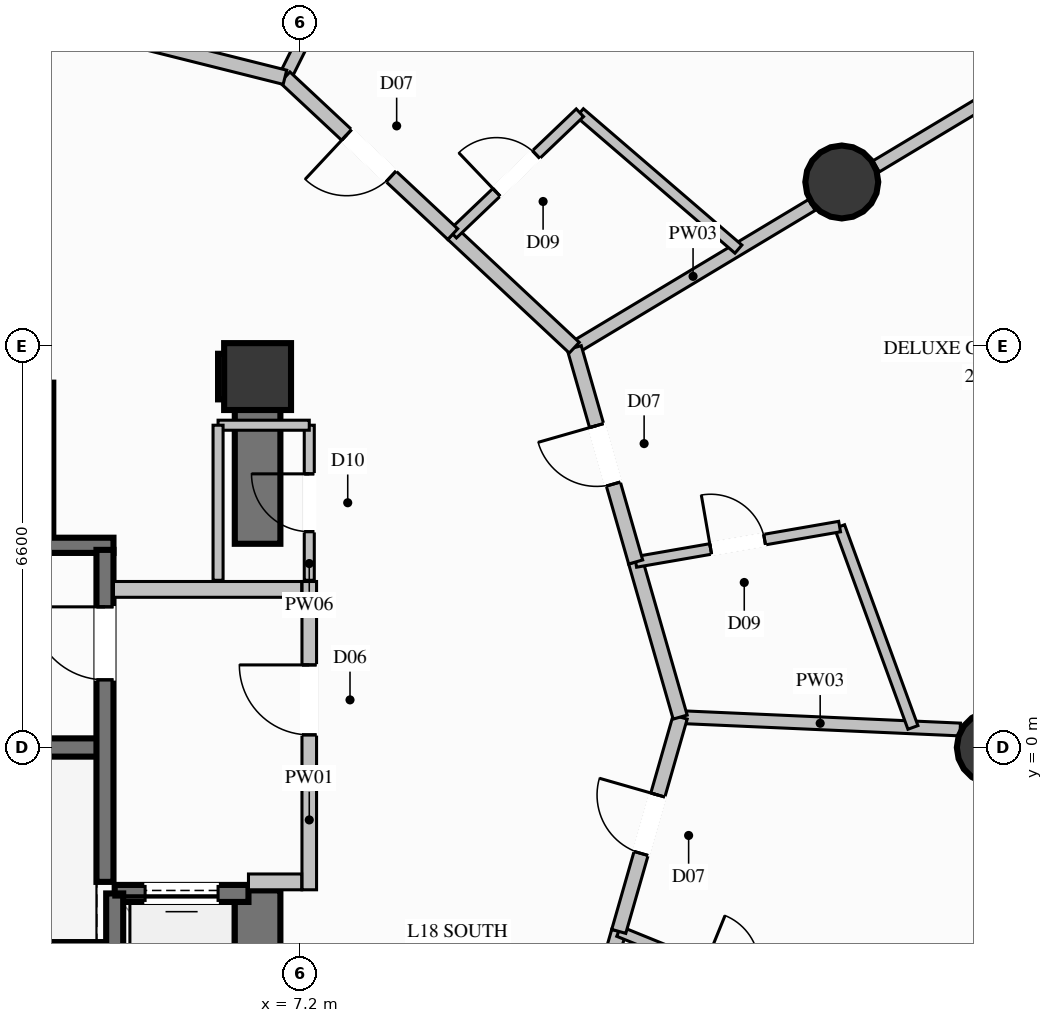
"""IFC4 building model, lengths in metres.
Left out: names, types, materials, properties, quantities, classifications, styles, units other than length and angle.
Written with IfcOpenShell. Run it as: python <this file> out.ifc"""

import sys

from ifc_helpers import new_model, si_unit, direction, frame, frame_2d, origin, origin_2d, place, context, subcontext, project, spatial, rectangle, circle, extrude, element, fill, save


model = new_model("IFC4")
c1 = context("Model", 3, precision=1e-05, world=origin(), true_north=direction((0.0, 1.0)))
c2 = subcontext(c1, "Body", "Model", "MODEL_VIEW")
j1 = project(units=[si_unit("LENGTHUNIT", "METRE"), si_unit("PLANEANGLEUNIT", "RADIAN")], contexts=[c1])
p1 = place(None, origin())
s1 = spatial("IfcSite", under=j1, at=p1, CompositionType="ELEMENT")
p2 = place(p1, origin())
s2 = spatial("IfcBuilding", under=s1, at=p2, CompositionType="ELEMENT")
p3 = place(p2, frame((0.0, 0.0, 75.2)))
s3 = spatial("IfcBuildingStorey", under=s2, at=p3, CompositionType="ELEMENT", Elevation=75.2)
p4 = place(p3, frame((6.5, 6.1, 0.0), z_axis=(0.0, 0.0, 1.0), x_axis=(1.0, 0.0, 0.0)))
e1 = element("IfcColumn", 1, at=p4, inside=s3, PredefinedType="COLUMN", context=c2, shape_type="SweptSolid", body=[
    extrude(rectangle(XDim=1.1, YDim=1.1, at=origin_2d()), origin(), (0.0, 0.0, 1.0), 3.6),
])
p5 = place(p3, frame((-3.99, 0.0, 0.0), z_axis=(0.0, 0.0, 1.0), x_axis=(1.0, 0.0, 0.0)))
e2 = element("IfcWall", 2, at=p5, inside=s3, PredefinedType="SHEAR", context=c2, shape_type="SweptSolid", body=[
    extrude(rectangle(XDim=7.98, YDim=0.3, at=frame_2d((3.99, 0.0))), origin(), (0.0, 0.0, 1.0), 3.6),
])
for number, where, z_axis, x_axis in (
    (3, (-4.13, -3.325, 0.0), (0.0, 0.0, 1.0), (1.0, 0.0, 0.0)),
    (4, (-4.13, 3.325, 0.0), (0.0, 0.0, 1.0), (1.0, 0.0, 0.0)),
):
    element("IfcWall", number, at=place(p3, frame(where, z_axis=z_axis, x_axis=x_axis)), inside=s3, PredefinedType="SOLIDWALL", context=c2, shape_type="SweptSolid", body=[
        extrude(rectangle(XDim=8.26, YDim=0.25, at=frame_2d((4.13, 0.0))), origin(), (0.0, 0.0, 1.0), 3.6),
    ])
p6 = place(p3, frame((5.85, 6.1, 0.0), z_axis=(0.0, 0.0, 1.0), x_axis=(1.0, 0.0, 0.0)))
e5 = element("IfcWall", 5, at=p6, inside=s3, PredefinedType="SHEAR", context=c2, shape_type="SweptSolid", body=[
    extrude(rectangle(XDim=0.275, YDim=0.75, at=frame_2d((0.137, 0.0))), origin(), (0.0, 0.0, 1.0), 3.6),
])
p7 = place(p3, frame((6.5, -6.475, 0.0), z_axis=(0.0, 0.0, 1.0), x_axis=(0.0, 1.0, 0.0)))
e6 = element("IfcWall", 6, at=p7, inside=s3, PredefinedType="SHEAR", context=c2, shape_type="SweptSolid", body=[
    extrude(rectangle(XDim=4.125, YDim=0.75, at=frame_2d((2.062, 0.0))), origin(), (0.0, 0.0, 1.0), 3.6),
])
p8 = place(p3, frame((6.5, 3.35, 0.0), z_axis=(0.0, 0.0, 1.0), x_axis=(0.0, 1.0, 0.0)))
e7 = element("IfcWall", 7, at=p8, inside=s3, PredefinedType="SHEAR", context=c2, shape_type="SweptSolid", body=[
    extrude(rectangle(XDim=3.125, YDim=0.75, at=frame_2d((1.562, 0.0))), origin(), (0.0, 0.0, 1.0), 3.6),
])
for number, where, z_axis, x_axis in (
    (8, (18.6, 0.0, 0.0), (0.0, 0.0, 1.0), (1.0, 0.0, 0.0)),
    (9, (16.108, 9.3, 0.0), (0.0, 0.0, 1.0), (1.0, 0.0, 0.0)),
):
    element("IfcColumn", number, at=place(p3, frame(where, z_axis=z_axis, x_axis=x_axis)), inside=s3, PredefinedType="COLUMN", context=c2, shape_type="SweptSolid", body=[
        extrude(circle(Radius=0.6, at=origin_2d()), origin(), (0.0, 0.0, 1.0), 3.6),
    ])
p9 = place(p3, frame((13.987, 16.682, 0.0), z_axis=(0.0, 0.0, 1.0), x_axis=(0.73100047145, -0.682376956484, 0.0)))
e10 = element("IfcWall", 10, at=p9, inside=s3, PredefinedType="SOLIDWALL", context=c2, shape_type="SweptSolid", body=[
    extrude(rectangle(XDim=8.149, YDim=0.32, at=frame_2d((4.075, 0.0))), origin(), (0.0, 0.0, 1.0), 3.34),
])
p10 = place(p9, frame((2.941, 0.0, 0.35)))
e11 = element("IfcOpeningElement", 11, at=p10, cuts=e10, PredefinedType="OPENING", context=c2, shape_type="SweptSolid", body=[
    extrude(rectangle(XDim=1.8, YDim=2.6, at=frame_2d((0.9, 1.3))), frame((0.0, 0.17, 0.0), z_axis=(0.0, -1.0, 0.0), x_axis=(1.0, 0.0, 0.0)), (0.0, 0.0, 1.0), 0.34),
])
p11 = place(p3, frame((3.0, 3.5, 0.0), z_axis=(0.0, 0.0, 1.0), x_axis=(0.0, 1.0, 0.0)))
e12 = element("IfcWall", 12, at=p11, inside=s3, PredefinedType="SOLIDWALL", context=c2, shape_type="SweptSolid", body=[
    extrude(rectangle(XDim=2.5, YDim=0.28, at=frame_2d((1.25, 0.0))), origin(), (0.0, 0.0, 1.0), 3.34),
])
p12 = place(p3, frame((6.35, -2.4, 0.0), z_axis=(0.0, 0.0, 1.0), x_axis=(-1.0, 0.0, 0.0)))
e13 = element("IfcWall", 13, at=p12, inside=s3, PredefinedType="SOLIDWALL", context=c2, shape_type="SweptSolid", body=[
    extrude(rectangle(XDim=2.2, YDim=0.28, at=frame_2d((1.1, 0.0))), origin(), (0.0, 0.0, 1.0), 3.34),
])
p13 = place(p12, frame((0.5, 0.0, 0.0)))
e14 = element("IfcOpeningElement", 14, at=p13, cuts=e13, PredefinedType="OPENING", context=c2, shape_type="SweptSolid", body=[
    extrude(rectangle(XDim=1.2, YDim=2.2, at=frame_2d((0.6, 1.1))), frame((0.0, 0.15, 0.0), z_axis=(0.0, -1.0, 0.0), x_axis=(1.0, 0.0, 0.0)), (0.0, 0.0, 1.0), 0.3),
])
p14 = place(p3, frame((4.15, -2.4, 0.0), z_axis=(0.0, 0.0, 1.0), x_axis=(0.0, -1.0, 0.0)))
e15 = element("IfcWall", 15, at=p14, inside=s3, PredefinedType="SOLIDWALL", context=c2, shape_type="SweptSolid", body=[
    extrude(rectangle(XDim=2.7, YDim=0.28, at=frame_2d((1.35, 0.0))), origin(), (0.0, 0.0, 1.0), 3.34),
])
p15 = place(p3, frame((3.99, -2.21, 0.0), z_axis=(0.0, 0.0, 1.0), x_axis=(0.0, 1.0, 0.0)))
e16 = element("IfcWall", 16, at=p15, inside=s3, PredefinedType="SOLIDWALL", context=c2, shape_type="SweptSolid", body=[
    extrude(rectangle(XDim=5.46, YDim=0.28, at=frame_2d((2.73, 0.0))), origin(), (0.0, 0.0, 1.0), 3.34),
])
p16 = place(p15, frame((3.323, 0.0, 0.0)))
e17 = element("IfcOpeningElement", 17, at=p16, cuts=e16, PredefinedType="OPENING", context=c2, shape_type="SweptSolid", body=[
    extrude(rectangle(XDim=1.2, YDim=2.2, at=frame_2d((0.6, 1.1))), frame((0.0, 0.15, 0.0), z_axis=(0.0, -1.0, 0.0), x_axis=(1.0, 0.0, 0.0)), (0.0, 0.0, 1.0), 0.3),
])
p17 = place(p3, frame((7.35, -2.34, 0.0), z_axis=(0.0, 0.0, 1.0), x_axis=(0.0, 1.0, 0.0)))
e18 = element("IfcWall", 18, at=p17, inside=s3, PredefinedType="PARTITIONING", context=c2, shape_type="SweptSolid", body=[
    extrude(rectangle(XDim=5.07, YDim=0.24, at=frame_2d((2.535, 0.0))), origin(), (0.0, 0.0, 1.0), 2.425),
])
p18 = place(p17, frame((2.548, 0.0, 0.0)))
e19 = element("IfcOpeningElement", 19, at=p18, cuts=e18, PredefinedType="OPENING", context=c2, shape_type="SweptSolid", body=[
    extrude(rectangle(XDim=1.15, YDim=2.2, at=frame_2d((0.575, 1.1))), frame((0.0, 0.13, 0.0), z_axis=(0.0, -1.0, 0.0), x_axis=(1.0, 0.0, 0.0)), (0.0, 0.0, 1.0), 0.26),
])
p19 = place(p3, frame((6.35, -2.21, 0.0), z_axis=(0.0, 0.0, 1.0), x_axis=(1.0, 0.0, 0.0)))
e20 = element("IfcWall", 20, at=p19, inside=s3, PredefinedType="PARTITIONING", context=c2, shape_type="SweptSolid", body=[
    extrude(rectangle(XDim=0.875, YDim=0.26, at=frame_2d((0.438, 0.0))), origin(), (0.0, 0.0, 1.0), 3.34),
])
p20 = place(p3, frame((4.13, 2.6, 0.0), z_axis=(0.0, 0.0, 1.0), x_axis=(1.0, 0.0, 0.0)))
e21 = element("IfcWall", 21, at=p20, inside=s3, PredefinedType="PARTITIONING", context=c2, shape_type="SweptSolid", body=[
    extrude(rectangle(XDim=3.095, YDim=0.26, at=frame_2d((1.548, 0.0))), origin(), (0.0, 0.0, 1.0), 3.34),
])
p21 = place(p3, frame((7.35, 2.75, 0.0), z_axis=(0.0, 0.0, 1.0), x_axis=(0.0, 1.0, 0.0)))
e22 = element("IfcWall", 22, at=p21, inside=s3, PredefinedType="PARTITIONING", context=c2, shape_type="SweptSolid", body=[
    extrude(rectangle(XDim=2.55, YDim=0.165, at=frame_2d((1.275, 0.0))), origin(), (0.0, 0.0, 1.0), 3.34),
])
p22 = place(p21, frame((0.8, 0.0, 0.0)))
e23 = element("IfcOpeningElement", 23, at=p22, cuts=e22, PredefinedType="OPENING", context=c2, shape_type="SweptSolid", body=[
    extrude(rectangle(XDim=0.95, YDim=2.1, at=frame_2d((0.475, 1.05))), frame((0.0, 0.093, 0.0), z_axis=(0.0, -1.0, 0.0), x_axis=(1.0, 0.0, 0.0)), (0.0, 0.0, 1.0), 0.185),
])
p23 = place(p3, frame((7.35, 5.3, 0.0), z_axis=(0.0, 0.0, 1.0), x_axis=(-1.0, 0.0, 0.0)))
e24 = element("IfcWall", 24, at=p23, inside=s3, PredefinedType="PARTITIONING", context=c2, shape_type="SweptSolid", body=[
    extrude(rectangle(XDim=1.5, YDim=0.165, at=frame_2d((0.75, 0.0))), origin(), (0.0, 0.0, 1.0), 2.425),
])
p24 = place(p3, frame((5.85, 5.3, 0.0), z_axis=(0.0, 0.0, 1.0), x_axis=(0.0, -1.0, 0.0)))
e25 = element("IfcWall", 25, at=p24, inside=s3, PredefinedType="PARTITIONING", context=c2, shape_type="SweptSolid", body=[
    extrude(rectangle(XDim=2.55, YDim=0.165, at=frame_2d((1.275, 0.0))), origin(), (0.0, 0.0, 1.0), 2.425),
])
p25 = place(p3, frame((13.45, 0.5, 0.0), z_axis=(0.0, 0.0, 1.0), x_axis=(0.999019228591, -0.044278447413, 0.0)))
e26 = element("IfcWall", 26, at=p25, inside=s3, PredefinedType="PARTITIONING", context=c2, shape_type="SweptSolid", body=[
    extrude(rectangle(XDim=4.61, YDim=0.21, at=frame_2d((2.305, 0.0))), origin(), (0.0, 0.0, 1.0), 3.34),
])
p26 = place(p3, frame((11.708, 6.575, 0.0), z_axis=(0.0, 0.0, 1.0), x_axis=(0.857261290525, 0.514881617236, 0.0)))
e27 = element("IfcWall", 27, at=p26, inside=s3, PredefinedType="PARTITIONING", context=c2, shape_type="SweptSolid", body=[
    extrude(rectangle(XDim=4.559, YDim=0.21, at=frame_2d((2.279, 0.0))), origin(), (0.0, 0.0, 1.0), 2.709),
])
p27 = place(p3, frame((16.672, 9.556, 0.0), z_axis=(0.0, 0.0, 1.0), x_axis=(0.857238479405, 0.514919595109, 0.0)))
e28 = element("IfcWall", 28, at=p27, inside=s3, PredefinedType="PARTITIONING", context=c2, shape_type="SweptSolid", body=[
    extrude(rectangle(XDim=3.473, YDim=0.21, at=frame_2d((1.736, 0.0))), origin(), (0.0, 0.0, 1.0), 3.34),
])
p28 = place(p3, frame((6.95, 11.022, 0.0), z_axis=(0.0, 0.0, 1.0), x_axis=(0.445768437474, 0.895148311819, 0.0)))
e29 = element("IfcWall", 29, at=p28, inside=s3, PredefinedType="PARTITIONING", context=c2, shape_type="SweptSolid", body=[
    extrude(rectangle(XDim=5.002, YDim=0.21, at=frame_2d((2.501, 0.0))), origin(), (0.0, 0.0, 1.0), 2.709),
])
p29 = place(p3, frame((11.708, -5.575, 0.0), z_axis=(0.0, 0.0, 1.0), x_axis=(0.275790140823, 0.961217872402, 0.0)))
e30 = element("IfcWall", 30, at=p29, inside=s3, PredefinedType="PARTITIONING", context=c2, shape_type="SweptSolid", body=[
    extrude(rectangle(XDim=2.654, YDim=0.24, at=frame_2d((1.327, 0.0))), origin(), (0.0, 0.0, 1.0), 3.34),
])
p30 = place(p3, frame((12.44, -3.024, 0.0), z_axis=(0.0, 0.0, 1.0), x_axis=(0.926338988139, -0.376690959613, 0.0)))
e31 = element("IfcWall", 31, at=p30, inside=s3, PredefinedType="PLUMBINGWALL", context=c2, shape_type="SweptSolid", body=[
    extrude(rectangle(XDim=3.943, YDim=0.175, at=frame_2d((1.971, 0.0))), origin(), (0.0, 0.0, 1.0), 3.34),
])
p31 = place(p30, frame((1.521, 0.0, 0.0)))
e32 = element("IfcOpeningElement", 32, at=p31, cuts=e31, PredefinedType="OPENING", context=c2, shape_type="SweptSolid", body=[
    extrude(rectangle(XDim=0.9, YDim=2.1, at=frame_2d((0.45, 1.05))), frame((0.0, 0.098, 0.0), z_axis=(0.0, -1.0, 0.0), x_axis=(1.0, 0.0, 0.0)), (0.0, 0.0, 1.0), 0.195),
])
p32 = place(p3, frame((12.44, -3.024, 0.0), z_axis=(0.0, 0.0, 1.0), x_axis=(0.275521481409, 0.961294914832, 0.0)))
e33 = element("IfcWall", 33, at=p32, inside=s3, PredefinedType="PARTITIONING", context=c2, shape_type="SweptSolid", body=[
    extrude(rectangle(XDim=3.666, YDim=0.24, at=frame_2d((1.833, 0.0))), origin(), (0.0, 0.0, 1.0), 3.34),
])
p33 = place(p32, frame((1.333, 0.0, 0.0)))
e34 = element("IfcOpeningElement", 34, at=p33, cuts=e33, PredefinedType="OPENING", context=c2, shape_type="SweptSolid", body=[
    extrude(rectangle(XDim=1.0, YDim=2.2, at=frame_2d((0.5, 1.1))), frame((0.0, 0.13, 0.0), z_axis=(0.0, -1.0, 0.0), x_axis=(1.0, 0.0, 0.0)), (0.0, 0.0, 1.0), 0.26),
])
p34 = place(p3, frame((13.45, 0.5, 0.0), z_axis=(0.0, 0.0, 1.0), x_axis=(-0.275790140823, 0.961217872402, 0.0)))
e35 = element("IfcWall", 35, at=p34, inside=s3, PredefinedType="PARTITIONING", context=c2, shape_type="SweptSolid", body=[
    extrude(rectangle(XDim=2.654, YDim=0.24, at=frame_2d((1.327, 0.0))), origin(), (0.0, 0.0, 1.0), 3.34),
])
p35 = place(p3, frame((17.278, 0.33, 0.0), z_axis=(0.0, 0.0, 1.0), x_axis=(-0.342991514452, 0.939338501827, 0.0)))
e36 = element("IfcWall", 36, at=p35, inside=s3, PredefinedType="PLUMBINGWALL", context=c2, shape_type="SweptSolid", body=[
    extrude(rectangle(XDim=3.516, YDim=0.175, at=frame_2d((1.758, 0.0))), origin(), (0.0, 0.0, 1.0), 3.34),
])
p36 = place(p3, frame((12.718, 3.051, 0.0), z_axis=(0.0, 0.0, 1.0), x_axis=(0.985274853181, 0.170977962584, 0.0)))
e37 = element("IfcWall", 37, at=p36, inside=s3, PredefinedType="PLUMBINGWALL", context=c2, shape_type="SweptSolid", body=[
    extrude(rectangle(XDim=3.404, YDim=0.175, at=frame_2d((1.702, 0.0))), origin(), (0.0, 0.0, 1.0), 3.34),
])
p37 = place(p36, frame((1.252, 0.0, 0.0)))
e38 = element("IfcOpeningElement", 38, at=p37, cuts=e37, PredefinedType="OPENING", context=c2, shape_type="SweptSolid", body=[
    extrude(rectangle(XDim=0.9, YDim=2.1, at=frame_2d((0.45, 1.05))), frame((0.0, 0.098, 0.0), z_axis=(0.0, -1.0, 0.0), x_axis=(1.0, 0.0, 0.0)), (0.0, 0.0, 1.0), 0.195),
])
p38 = place(p3, frame((12.718, 3.051, 0.0), z_axis=(0.0, 0.0, 1.0), x_axis=(-0.275521481409, 0.961294914832, 0.0)))
e39 = element("IfcWall", 39, at=p38, inside=s3, PredefinedType="PARTITIONING", context=c2, shape_type="SweptSolid", body=[
    extrude(rectangle(XDim=3.666, YDim=0.24, at=frame_2d((1.833, 0.0))), origin(), (0.0, 0.0, 1.0), 3.34),
])
p39 = place(p38, frame((1.333, 0.0, 0.0)))
e40 = element("IfcOpeningElement", 40, at=p39, cuts=e39, PredefinedType="OPENING", context=c2, shape_type="SweptSolid", body=[
    extrude(rectangle(XDim=1.0, YDim=2.2, at=frame_2d((0.5, 1.1))), frame((0.0, 0.13, 0.0), z_axis=(0.0, -1.0, 0.0), x_axis=(1.0, 0.0, 0.0)), (0.0, 0.0, 1.0), 0.26),
])
p40 = place(p3, frame((11.708, 6.575, 0.0), z_axis=(0.0, 0.0, 1.0), x_axis=(-0.730449499178, 0.682966711597, 0.0)))
e41 = element("IfcWall", 41, at=p40, inside=s3, PredefinedType="PARTITIONING", context=c2, shape_type="SweptSolid", body=[
    extrude(rectangle(XDim=2.735, YDim=0.24, at=frame_2d((1.368, 0.0))), origin(), (0.0, 0.0, 1.0), 3.34),
])
p41 = place(p3, frame((14.408, 8.196, 0.0), z_axis=(0.0, 0.0, 1.0), x_axis=(-0.758188004492, 0.652036003488, 0.0)))
e42 = element("IfcWall", 42, at=p41, inside=s3, PredefinedType="PLUMBINGWALL", context=c2, shape_type="SweptSolid", body=[
    extrude(rectangle(XDim=3.438, YDim=0.175, at=frame_2d((1.719, 0.0))), origin(), (0.0, 0.0, 1.0), 3.34),
])
p42 = place(p3, frame((9.71, 8.443, 0.0), z_axis=(0.0, 0.0, 1.0), x_axis=(0.723553055792, 0.690268770447, 0.0)))
e43 = element("IfcWall", 43, at=p42, inside=s3, PredefinedType="PLUMBINGWALL", context=c2, shape_type="SweptSolid", body=[
    extrude(rectangle(XDim=2.89, YDim=0.175, at=frame_2d((1.445, 0.0))), origin(), (0.0, 0.0, 1.0), 3.34),
])
p43 = place(p42, frame((0.995, 0.0, 0.0)))
e44 = element("IfcOpeningElement", 44, at=p43, cuts=e43, PredefinedType="OPENING", context=c2, shape_type="SweptSolid", body=[
    extrude(rectangle(XDim=0.9, YDim=2.1, at=frame_2d((0.45, 1.05))), frame((0.0, 0.098, 0.0), z_axis=(0.0, -1.0, 0.0), x_axis=(1.0, 0.0, 0.0)), (0.0, 0.0, 1.0), 0.195),
])
p44 = place(p3, frame((9.71, 8.443, 0.0), z_axis=(0.0, 0.0, 1.0), x_axis=(-0.730679025356, 0.682721145054, 0.0)))
e45 = element("IfcWall", 45, at=p44, inside=s3, PredefinedType="PARTITIONING", context=c2, shape_type="SweptSolid", body=[
    extrude(rectangle(XDim=3.777, YDim=0.24, at=frame_2d((1.889, 0.0))), origin(), (0.0, 0.0, 1.0), 3.34),
])
p45 = place(p44, frame((1.389, 0.0, 0.0)))
e46 = element("IfcOpeningElement", 46, at=p45, cuts=e45, PredefinedType="OPENING", context=c2, shape_type="SweptSolid", body=[
    extrude(rectangle(XDim=1.0, YDim=2.2, at=frame_2d((0.5, 1.1))), frame((0.0, 0.13, 0.0), z_axis=(0.0, -1.0, 0.0), x_axis=(1.0, 0.0, 0.0)), (0.0, 0.0, 1.0), 0.26),
])
p46 = place(p3, frame((6.95, 11.022, 0.0), z_axis=(0.0, 0.0, 1.0), x_axis=(-0.970009682466, 0.243066278865, 0.0)))
e47 = element("IfcWall", 47, at=p46, inside=s3, PredefinedType="PARTITIONING", context=c2, shape_type="SweptSolid", body=[
    extrude(rectangle(XDim=2.814, YDim=0.24, at=frame_2d((1.407, 0.0))), origin(), (0.0, 0.0, 1.0), 3.34),
])
p47 = place(p13, origin())
e48 = element("IfcDoor", 48, at=p47, inside=s3, OperationType="SLIDING_TO_LEFT", PredefinedType="DOOR", context=c2, shape_type="SweptSolid", body=[
    extrude(rectangle(XDim=1.2, YDim=2.2, at=frame_2d((0.6, 1.1))), frame((0.0, 0.025, 0.0), z_axis=(0.0, -1.0, 0.0), x_axis=(1.0, 0.0, 0.0)), (0.0, 0.0, 1.0), 0.05),
])
fill(e14, e48)
p48 = place(p16, origin())
e49 = element("IfcDoor", 49, at=p48, inside=s3, OperationType="SINGLE_SWING_RIGHT", PredefinedType="DOOR", context=c2, shape_type="SweptSolid", body=[
    extrude(rectangle(XDim=1.2, YDim=2.2, at=frame_2d((0.6, 1.1))), frame((0.0, 0.025, 0.0), z_axis=(0.0, -1.0, 0.0), x_axis=(1.0, 0.0, 0.0)), (0.0, 0.0, 1.0), 0.05),
])
fill(e17, e49)
p49 = place(p18, origin())
e50 = element("IfcDoor", 50, at=p49, inside=s3, OperationType="SINGLE_SWING_RIGHT", PredefinedType="DOOR", context=c2, shape_type="SweptSolid", body=[
    extrude(rectangle(XDim=1.15, YDim=2.2, at=frame_2d((0.575, 1.1))), frame((0.0, 0.025, 0.0), z_axis=(0.0, -1.0, 0.0), x_axis=(1.0, 0.0, 0.0)), (0.0, 0.0, 1.0), 0.05),
])
fill(e19, e50)
p50 = place(p22, origin())
e51 = element("IfcDoor", 51, at=p50, inside=s3, OperationType="SINGLE_SWING_RIGHT", PredefinedType="DOOR", context=c2, shape_type="SweptSolid", body=[
    extrude(rectangle(XDim=0.95, YDim=2.1, at=frame_2d((0.475, 1.05))), frame((0.0, 0.025, 0.0), z_axis=(0.0, -1.0, 0.0), x_axis=(1.0, 0.0, 0.0)), (0.0, 0.0, 1.0), 0.05),
])
fill(e23, e51)
p51 = place(p33, origin())
e52 = element("IfcDoor", 52, at=p51, inside=s3, OperationType="SINGLE_SWING_RIGHT", PredefinedType="DOOR", context=c2, shape_type="SweptSolid", body=[
    extrude(rectangle(XDim=1.0, YDim=2.2, at=frame_2d((0.5, 1.1))), frame((0.0, 0.025, 0.0), z_axis=(0.0, -1.0, 0.0), x_axis=(1.0, 0.0, 0.0)), (0.0, 0.0, 1.0), 0.05),
])
fill(e34, e52)
p52 = place(p37, origin())
e53 = element("IfcDoor", 53, at=p52, inside=s3, OperationType="SINGLE_SWING_LEFT", PredefinedType="DOOR", context=c2, shape_type="SweptSolid", body=[
    extrude(rectangle(XDim=0.9, YDim=2.1, at=frame_2d((0.45, 1.05))), frame((0.0, 0.025, 0.0), z_axis=(0.0, -1.0, 0.0), x_axis=(1.0, 0.0, 0.0)), (0.0, 0.0, 1.0), 0.05),
])
fill(e38, e53)
p53 = place(p39, origin())
e54 = element("IfcDoor", 54, at=p53, inside=s3, OperationType="SINGLE_SWING_RIGHT", PredefinedType="DOOR", context=c2, shape_type="SweptSolid", body=[
    extrude(rectangle(XDim=1.0, YDim=2.2, at=frame_2d((0.5, 1.1))), frame((0.0, 0.025, 0.0), z_axis=(0.0, -1.0, 0.0), x_axis=(1.0, 0.0, 0.0)), (0.0, 0.0, 1.0), 0.05),
])
fill(e40, e54)
p54 = place(p43, origin())
e55 = element("IfcDoor", 55, at=p54, inside=s3, OperationType="SINGLE_SWING_LEFT", PredefinedType="DOOR", context=c2, shape_type="SweptSolid", body=[
    extrude(rectangle(XDim=0.9, YDim=2.1, at=frame_2d((0.45, 1.05))), frame((0.0, 0.025, 0.0), z_axis=(0.0, -1.0, 0.0), x_axis=(1.0, 0.0, 0.0)), (0.0, 0.0, 1.0), 0.05),
])
fill(e44, e55)
p55 = place(p45, origin())
e56 = element("IfcDoor", 56, at=p55, inside=s3, OperationType="SINGLE_SWING_RIGHT", PredefinedType="DOOR", context=c2, shape_type="SweptSolid", body=[
    extrude(rectangle(XDim=1.0, YDim=2.2, at=frame_2d((0.5, 1.1))), frame((0.0, 0.025, 0.0), z_axis=(0.0, -1.0, 0.0), x_axis=(1.0, 0.0, 0.0)), (0.0, 0.0, 1.0), 0.05),
])
fill(e46, e56)
save(model, sys.argv[1])
